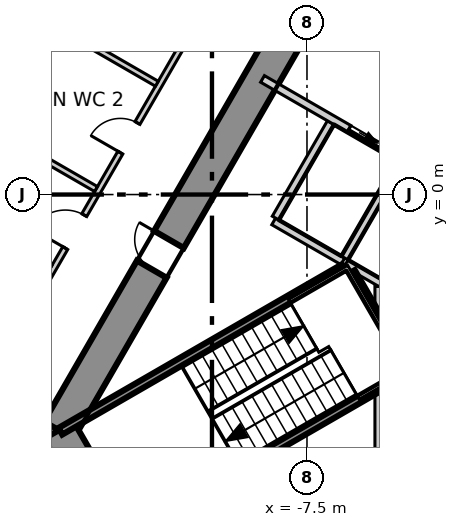
"""IFC4 building model, lengths in metres.
Left out: names, types, materials, properties, quantities, classifications, styles, units other than length and angle.
Written with IfcOpenShell. Run it as: python <this file> out.ifc"""

import sys

from ifc_helpers import new_model, si_unit, direction, frame, frame_2d, origin, place, context, subcontext, project, spatial, polyline, rectangle, outline, extrude, element, fill, save


model = new_model("IFC4")
c1 = context("Model", 3, precision=1e-05, world=origin(), true_north=direction((0.0, 1.0)))
c2 = subcontext(c1, "Body", "Model", "MODEL_VIEW")
j1 = project(units=[si_unit("LENGTHUNIT", "METRE"), si_unit("PLANEANGLEUNIT", "RADIAN")], contexts=[c1])
p1 = place(None, origin())
s1 = spatial("IfcSite", under=j1, at=p1, CompositionType="ELEMENT")
p2 = place(p1, origin())
s2 = spatial("IfcBuilding", under=s1, at=p2, CompositionType="ELEMENT")
p3 = place(p2, frame((0.0, 0.0, 83.3)))
s3 = spatial("IfcBuildingStorey", under=s2, at=p3, CompositionType="ELEMENT", Elevation=83.3)
p4 = place(p3, frame((-1.645, 15.25, -0.3), z_axis=(0.0, 0.0, 1.0), x_axis=(-0.500026485275, -0.866010111964, 0.0)))
e1 = element("IfcWall", 1, at=p4, inside=s3, PredefinedType="SHEAR", context=c2, shape_type="SweptSolid", body=[
    extrude(outline(polyline([(-0.26, -0.45), (1.685, -0.45), (3.63, -0.45), (5.576, -0.45), (7.521, -0.45), (9.466, -0.449), (11.411, -0.449), (13.357, -0.449), (15.302, -0.449), (17.247, -0.449), (19.192, -0.449), (21.138, -0.449), (23.083, -0.449), (25.028, -0.449), (24.509, 0.45), (22.644, 0.45), (20.778, 0.45), (18.913, 0.45), (17.048, 0.45), (15.182, 0.449), (13.317, 0.449), (11.452, 0.449), (9.587, 0.449), (7.721, 0.449), (5.856, 0.449), (3.991, 0.449), (2.125, 0.449), (0.26, 0.449), (-0.26, -0.45)])), origin(), (0.0, 0.0, 1.0), 4.0),
])
p5 = place(p4, frame((11.834, 0.0, 0.3)))
e2 = element("IfcOpeningElement", 2, at=p5, cuts=e1, PredefinedType="OPENING", context=c2, shape_type="SweptSolid", body=[
    extrude(rectangle(XDim=1.1, YDim=2.1, at=frame_2d((0.55, 1.05))), frame((0.0, 0.46, 0.0), z_axis=(0.0, -1.0, 0.0), x_axis=(1.0, 0.0, 0.0)), (0.0, 0.0, 1.0), 0.92),
])
p6 = place(p4, frame((18.976, 0.0, 0.3)))
e3 = element("IfcOpeningElement", 3, at=p6, cuts=e1, PredefinedType="OPENING", context=c2, shape_type="SweptSolid", body=[
    extrude(rectangle(XDim=0.9, YDim=2.1, at=frame_2d((0.45, 1.05))), frame((0.0, 0.46, 0.0), z_axis=(0.0, -1.0, 0.0), x_axis=(1.0, 0.0, 0.0)), (0.0, 0.0, 1.0), 0.92),
])
p7 = place(p3, frame((-14.03, -6.2, -0.3), z_axis=(0.0, 0.0, 1.0), x_axis=(0.500111984565, -0.865960739811, 0.0)))
e4 = element("IfcWall", 4, at=p7, inside=s3, PredefinedType="SHEAR", context=c2, shape_type="SweptSolid", body=[
    extrude(outline(polyline([(-0.26, -0.449), (1.646, -0.449), (3.551, -0.45), (3.032, 0.45), (1.646, 0.45), (0.26, 0.45), (-0.26, -0.449)])), origin(), (0.0, 0.0, 1.0), 4.0),
])
p8 = place(p7, frame((0.946, 0.0, 0.3)))
e5 = element("IfcOpeningElement", 5, at=p8, cuts=e4, PredefinedType="OPENING", context=c2, shape_type="SweptSolid", body=[
    extrude(rectangle(XDim=1.4, YDim=2.1, at=frame_2d((0.7, 1.05))), frame((0.0, 0.46, 0.0), z_axis=(0.0, -1.0, 0.0), x_axis=(1.0, 0.0, 0.0)), (0.0, 0.0, 1.0), 0.92),
])
p9 = place(p3, frame((-3.28, 36.577, 0.0), z_axis=(0.0, 0.0, 1.0), x_axis=(-0.500001635065, -0.866024459777, 0.0)))
e6 = element("IfcWall", 6, at=p9, inside=s3, PredefinedType="ELEMENTEDWALL", context=c2, shape_type="SweptSolid", body=[
    extrude(rectangle(XDim=60.053, YDim=0.2, at=frame_2d((30.027, 0.0))), origin(), (0.0, 0.0, 1.0), 3.7),
])
p10 = place(p9, frame((2.094, 0.0, 0.9)))
e7 = element("IfcOpeningElement", 7, at=p10, cuts=e6, PredefinedType="OPENING", context=c2, shape_type="SweptSolid", body=[
    extrude(rectangle(XDim=5.6, YDim=2.5, at=frame_2d((2.8, 1.25))), frame((0.0, 0.11, 0.0), z_axis=(0.0, -1.0, 0.0), x_axis=(1.0, 0.0, 0.0)), (0.0, 0.0, 1.0), 0.22),
])
p11 = place(p9, frame((9.278, 0.0, 0.9)))
e8 = element("IfcOpeningElement", 8, at=p11, cuts=e6, PredefinedType="OPENING", context=c2, shape_type="SweptSolid", body=[
    extrude(rectangle(XDim=5.6, YDim=2.5, at=frame_2d((2.8, 1.25))), frame((0.0, 0.11, 0.0), z_axis=(0.0, -1.0, 0.0), x_axis=(1.0, 0.0, 0.0)), (0.0, 0.0, 1.0), 0.22),
])
p12 = place(p9, frame((16.461, 0.0, 0.9)))
e9 = element("IfcOpeningElement", 9, at=p12, cuts=e6, PredefinedType="OPENING", context=c2, shape_type="SweptSolid", body=[
    extrude(rectangle(XDim=5.6, YDim=2.5, at=frame_2d((2.8, 1.25))), frame((0.0, 0.11, 0.0), z_axis=(0.0, -1.0, 0.0), x_axis=(1.0, 0.0, 0.0)), (0.0, 0.0, 1.0), 0.22),
])
p13 = place(p9, frame((23.645, 0.0, 0.9)))
e10 = element("IfcOpeningElement", 10, at=p13, cuts=e6, PredefinedType="OPENING", context=c2, shape_type="SweptSolid", body=[
    extrude(rectangle(XDim=5.6, YDim=2.5, at=frame_2d((2.8, 1.25))), frame((0.0, 0.11, 0.0), z_axis=(0.0, -1.0, 0.0), x_axis=(1.0, 0.0, 0.0)), (0.0, 0.0, 1.0), 0.22),
])
p14 = place(p9, frame((30.828, 0.0, 0.9)))
e11 = element("IfcOpeningElement", 11, at=p14, cuts=e6, PredefinedType="OPENING", context=c2, shape_type="SweptSolid", body=[
    extrude(rectangle(XDim=5.6, YDim=2.5, at=frame_2d((2.8, 1.25))), frame((0.0, 0.11, 0.0), z_axis=(0.0, -1.0, 0.0), x_axis=(1.0, 0.0, 0.0)), (0.0, 0.0, 1.0), 0.22),
])
p15 = place(p9, frame((38.012, 0.0, 0.9)))
e12 = element("IfcOpeningElement", 12, at=p15, cuts=e6, PredefinedType="OPENING", context=c2, shape_type="SweptSolid", body=[
    extrude(rectangle(XDim=5.6, YDim=2.5, at=frame_2d((2.8, 1.25))), frame((0.0, 0.11, 0.0), z_axis=(0.0, -1.0, 0.0), x_axis=(1.0, 0.0, 0.0)), (0.0, 0.0, 1.0), 0.22),
])
p16 = place(p9, frame((45.195, 0.0, 0.9)))
e13 = element("IfcOpeningElement", 13, at=p16, cuts=e6, PredefinedType="OPENING", context=c2, shape_type="SweptSolid", body=[
    extrude(rectangle(XDim=5.6, YDim=2.5, at=frame_2d((2.8, 1.25))), frame((0.0, 0.11, 0.0), z_axis=(0.0, -1.0, 0.0), x_axis=(1.0, 0.0, 0.0)), (0.0, 0.0, 1.0), 0.22),
])
p17 = place(p9, frame((52.379, 0.0, 0.9)))
e14 = element("IfcOpeningElement", 14, at=p17, cuts=e6, PredefinedType="OPENING", context=c2, shape_type="SweptSolid", body=[
    extrude(rectangle(XDim=5.6, YDim=2.5, at=frame_2d((2.8, 1.25))), frame((0.0, 0.11, 0.0), z_axis=(0.0, -1.0, 0.0), x_axis=(1.0, 0.0, 0.0)), (0.0, 0.0, 1.0), 0.22),
])
p18 = place(p3, frame((-19.497, -11.17, 0.0), z_axis=(0.0, 0.0, 1.0), x_axis=(0.499998854553, 0.866026065108, 0.0)))
e15 = element("IfcWall", 15, at=p18, inside=s3, PredefinedType="PARTITIONING", context=c2, shape_type="SweptSolid", body=[
    extrude(rectangle(XDim=38.994, YDim=0.15, at=frame_2d((19.497, 0.0))), origin(), (0.0, 0.0, 1.0), 3.7),
])
p19 = place(p18, frame((35.844, 0.0, 0.0)))
e16 = element("IfcOpeningElement", 16, at=p19, cuts=e15, PredefinedType="OPENING", context=c2, shape_type="SweptSolid", body=[
    extrude(rectangle(XDim=1.1, YDim=2.1, at=frame_2d((0.55, 1.05))), frame((0.0, 0.085, 0.0), z_axis=(0.0, -1.0, 0.0), x_axis=(1.0, 0.0, 0.0)), (0.0, 0.0, 1.0), 0.17),
])
p20 = place(p18, frame((26.04, 0.0, 0.0)))
e17 = element("IfcOpeningElement", 17, at=p20, cuts=e15, PredefinedType="OPENING", context=c2, shape_type="SweptSolid", body=[
    extrude(rectangle(XDim=1.1, YDim=2.1, at=frame_2d((0.55, 1.05))), frame((0.0, 0.085, 0.0), z_axis=(0.0, -1.0, 0.0), x_axis=(1.0, 0.0, 0.0)), (0.0, 0.0, 1.0), 0.17),
])
p21 = place(p18, frame((7.272, 0.0, 0.0)))
e18 = element("IfcOpeningElement", 18, at=p21, cuts=e15, PredefinedType="OPENING", context=c2, shape_type="SweptSolid", body=[
    extrude(rectangle(XDim=1.1, YDim=2.1, at=frame_2d((0.55, 1.05))), frame((0.0, 0.085, 0.0), z_axis=(0.0, -1.0, 0.0), x_axis=(1.0, 0.0, 0.0)), (0.0, 0.0, 1.0), 0.17),
])
p22 = place(p18, frame((17.372, 0.0, 0.0)))
e19 = element("IfcOpeningElement", 19, at=p22, cuts=e15, PredefinedType="OPENING", context=c2, shape_type="SweptSolid", body=[
    extrude(rectangle(XDim=0.9, YDim=2.1, at=frame_2d((0.45, 1.05))), frame((0.0, 0.085, 0.0), z_axis=(0.0, -1.0, 0.0), x_axis=(1.0, 0.0, 0.0)), (0.0, 0.0, 1.0), 0.17),
])
p23 = place(p18, frame((14.172, 0.0, 0.0)))
e20 = element("IfcOpeningElement", 20, at=p23, cuts=e15, PredefinedType="OPENING", context=c2, shape_type="SweptSolid", body=[
    extrude(rectangle(XDim=0.9, YDim=2.1, at=frame_2d((0.45, 1.05))), frame((0.0, 0.085, 0.0), z_axis=(0.0, -1.0, 0.0), x_axis=(1.0, 0.0, 0.0)), (0.0, 0.0, 1.0), 0.17),
])
p24 = place(p18, frame((11.272, 0.0, 0.0)))
e21 = element("IfcOpeningElement", 21, at=p24, cuts=e15, PredefinedType="OPENING", context=c2, shape_type="SweptSolid", body=[
    extrude(rectangle(XDim=1.0, YDim=2.1, at=frame_2d((0.5, 1.05))), frame((0.0, 0.085, 0.0), z_axis=(0.0, -1.0, 0.0), x_axis=(1.0, 0.0, 0.0)), (0.0, 0.0, 1.0), 0.17),
])
p25 = place(p18, frame((1.904, 0.0, 0.0)))
e22 = element("IfcOpeningElement", 22, at=p25, cuts=e15, PredefinedType="OPENING", context=c2, shape_type="SweptSolid", body=[
    extrude(rectangle(XDim=1.1, YDim=2.1, at=frame_2d((0.55, 1.05))), frame((0.0, 0.085, 0.0), z_axis=(0.0, -1.0, 0.0), x_axis=(1.0, 0.0, 0.0)), (0.0, 0.0, 1.0), 0.17),
])
p26 = place(p3, frame((-17.304, -0.171, 0.0), z_axis=(0.0, 0.0, 1.0), x_axis=(0.500054279689, 0.865994063124, 0.0)))
e23 = element("IfcWall", 23, at=p26, inside=s3, PredefinedType="PARTITIONING", context=c2, shape_type="SweptSolid", body=[
    extrude(rectangle(XDim=8.725, YDim=0.15, at=frame_2d((4.363, 0.0))), origin(), (0.0, 0.0, 1.0), 3.7),
])
for number, where, z_axis, x_axis in (
    (24, (-16.039, 1.87, 0.0), (0.0, 0.0, 1.0), (0.866, -0.5, 0.0)),
    (25, (-14.439, 4.641, 0.0), (0.0, 0.0, 1.0), (0.866, -0.5, 0.0)),
):
    element("IfcWall", number, at=place(p3, frame(where, z_axis=z_axis, x_axis=x_axis)), inside=s3, PredefinedType="PARTITIONING", context=c2, shape_type="SweptSolid", body=[
        extrude(rectangle(XDim=3.45, YDim=0.15, at=frame_2d((1.725, 0.0))), origin(), (0.0, 0.0, 1.0), 3.7),
    ])
p27 = place(p3, frame((-8.376, -0.707, 0.0), z_axis=(0.0, 0.0, 1.0), x_axis=(0.866067520717, -0.499927044236, 0.0)))
e26 = element("IfcWall", 26, at=p27, inside=s3, PredefinedType="SOLIDWALL", context=c2, shape_type="SweptSolid", body=[
    extrude(rectangle(XDim=2.1, YDim=0.2, at=frame_2d((1.05, 0.0))), origin(), (0.0, 0.0, 1.0), 3.7),
])
p28 = place(p3, frame((-8.326, -0.62, 0.0), z_axis=(0.0, 0.0, 1.0), x_axis=(0.500023687443, 0.866011727401, 0.0)))
e27 = element("IfcWall", 27, at=p28, inside=s3, PredefinedType="SOLIDWALL", context=c2, shape_type="SweptSolid", body=[
    extrude(rectangle(XDim=2.9, YDim=0.2, at=frame_2d((1.45, 0.0))), origin(), (0.0, 0.0, 1.0), 3.7),
])
p29 = place(p3, frame((-8.67, 3.043, 0.0), z_axis=(0.0, 0.0, 1.0), x_axis=(0.866029956157, -0.499992114976, 0.0)))
e28 = element("IfcWall", 28, at=p29, inside=s3, PredefinedType="SOLIDWALL", context=c2, shape_type="SweptSolid", body=[
    extrude(rectangle(XDim=4.232, YDim=0.2, at=frame_2d((2.116, 0.0))), origin(), (0.0, 0.0, 1.0), 3.7),
])
p30 = place(p29, frame((2.63, 0.0, 0.0)))
e29 = element("IfcOpeningElement", 29, at=p30, cuts=e28, PredefinedType="OPENING", context=c2, shape_type="SweptSolid", body=[
    extrude(rectangle(XDim=1.1, YDim=2.1, at=frame_2d((0.55, 1.05))), frame((0.0, 0.11, 0.0), z_axis=(0.0, -1.0, 0.0), x_axis=(1.0, 0.0, 0.0)), (0.0, 0.0, 1.0), 0.22),
])
p31 = place(p3, frame((-6.507, -1.67, 0.0), z_axis=(0.0, 0.0, 1.0), x_axis=(0.50012328804, 0.865954211699, 0.0)))
e30 = element("IfcWall", 30, at=p31, inside=s3, PredefinedType="SOLIDWALL", context=c2, shape_type="SweptSolid", body=[
    extrude(rectangle(XDim=2.9, YDim=0.2, at=frame_2d((1.45, 0.0))), origin(), (0.0, 0.0, 1.0), 3.7),
])
p32 = place(p3, frame((-6.47, -1.807, 0.0), z_axis=(0.0, 0.0, 1.0), x_axis=(0.865883195159, -0.500246231712, 0.0)))
e31 = element("IfcWall", 31, at=p32, inside=s3, PredefinedType="SOLIDWALL", context=c2, shape_type="SweptSolid", body=[
    extrude(rectangle(XDim=1.815, YDim=0.2, at=frame_2d((0.908, 0.0))), origin(), (0.0, 0.0, 1.0), 3.7),
])
p33 = place(p3, frame((-5.612, -9.03, 0.0), z_axis=(0.0, 0.0, 1.0), x_axis=(0.0, 1.0, 0.0)))
e32 = element("IfcWall", 32, at=p33, inside=s3, PredefinedType="SOLIDWALL", context=c2, shape_type="SweptSolid", body=[
    extrude(rectangle(XDim=3.827, YDim=0.2, at=frame_2d((1.914, 0.0))), origin(), (0.0, 0.0, 1.0), 3.7),
])
p34 = place(p3, frame((-5.612, -3.08, 0.0), z_axis=(0.0, 0.0, 1.0), x_axis=(0.0, 1.0, 0.0)))
e33 = element("IfcWall", 33, at=p34, inside=s3, PredefinedType="SOLIDWALL", context=c2, shape_type="SweptSolid", body=[
    extrude(rectangle(XDim=0.662, YDim=0.2, at=frame_2d((0.331, 0.0))), origin(), (0.0, 0.0, 1.0), 3.7),
])
p35 = place(p3, frame((-13.99, -6.229, 0.0), z_axis=(0.0, 0.0, 1.0), x_axis=(0.866060059011, 0.499939970583, 0.0)))
e34 = element("IfcWall", 34, at=p35, inside=s3, PredefinedType="SOLIDWALL", context=c2, shape_type="SweptSolid", body=[
    extrude(rectangle(XDim=8.615, YDim=0.2, at=frame_2d((4.307, 0.0))), origin(), (0.0, 0.0, 1.0), 3.7),
])
p36 = place(p3, frame((-6.329, -2.038, 0.0), z_axis=(0.0, 0.0, 1.0), x_axis=(0.500200581029, -0.865909567298, 0.0)))
e35 = element("IfcWall", 35, at=p36, inside=s3, PredefinedType="SOLIDWALL", context=c2, shape_type="SweptSolid", body=[
    extrude(rectangle(XDim=2.799, YDim=0.2, at=frame_2d((1.399, 0.0))), origin(), (0.0, 0.0, 1.0), 3.7),
])
p37 = place(p3, frame((-12.39, -9.001, 0.0), z_axis=(0.0, 0.0, 1.0), x_axis=(0.866010975815, 0.500024989144, 0.0)))
e36 = element("IfcWall", 36, at=p37, inside=s3, PredefinedType="SOLIDWALL", context=c2, shape_type="SweptSolid", body=[
    extrude(rectangle(XDim=8.615, YDim=0.2, at=frame_2d((4.308, 0.0))), origin(), (0.0, 0.0, 1.0), 3.7),
])
p38 = place(p30, origin())
e37 = element("IfcDoor", 37, at=p38, inside=s3, OperationType="SLIDING_TO_LEFT", PredefinedType="DOOR", context=c2, shape_type="SweptSolid", body=[
    extrude(rectangle(XDim=1.1, YDim=2.1, at=frame_2d((0.55, 1.05))), frame((0.0, 0.025, 0.0), z_axis=(0.0, -1.0, 0.0), x_axis=(1.0, 0.0, 0.0)), (0.0, 0.0, 1.0), 0.05),
])
fill(e29, e37)
p39 = place(p23, origin())
e38 = element("IfcDoor", 38, at=p39, inside=s3, OperationType="SINGLE_SWING_RIGHT", PredefinedType="DOOR", context=c2, shape_type="SweptSolid", body=[
    extrude(rectangle(XDim=0.9, YDim=2.1, at=frame_2d((0.45, 1.05))), frame((0.0, 0.025, 0.0), z_axis=(0.0, -1.0, 0.0), x_axis=(1.0, 0.0, 0.0)), (0.0, 0.0, 1.0), 0.05),
])
fill(e20, e38)
p40 = place(p24, origin())
e39 = element("IfcDoor", 39, at=p40, inside=s3, OperationType="SINGLE_SWING_RIGHT", PredefinedType="DOOR", context=c2, shape_type="SweptSolid", body=[
    extrude(rectangle(XDim=1.0, YDim=2.1, at=frame_2d((0.5, 1.05))), frame((0.0, 0.025, 0.0), z_axis=(0.0, -1.0, 0.0), x_axis=(1.0, 0.0, 0.0)), (0.0, 0.0, 1.0), 0.05),
])
fill(e21, e39)
p41 = place(p6, origin())
e40 = element("IfcDoor", 40, at=p41, inside=s3, OperationType="SINGLE_SWING_LEFT", PredefinedType="DOOR", context=c2, shape_type="SweptSolid", body=[
    extrude(rectangle(XDim=0.9, YDim=2.1, at=frame_2d((0.45, 1.05))), frame((0.0, 0.025, 0.0), z_axis=(0.0, -1.0, 0.0), x_axis=(1.0, 0.0, 0.0)), (0.0, 0.0, 1.0), 0.05),
])
fill(e3, e40)
save(model, sys.argv[1])
